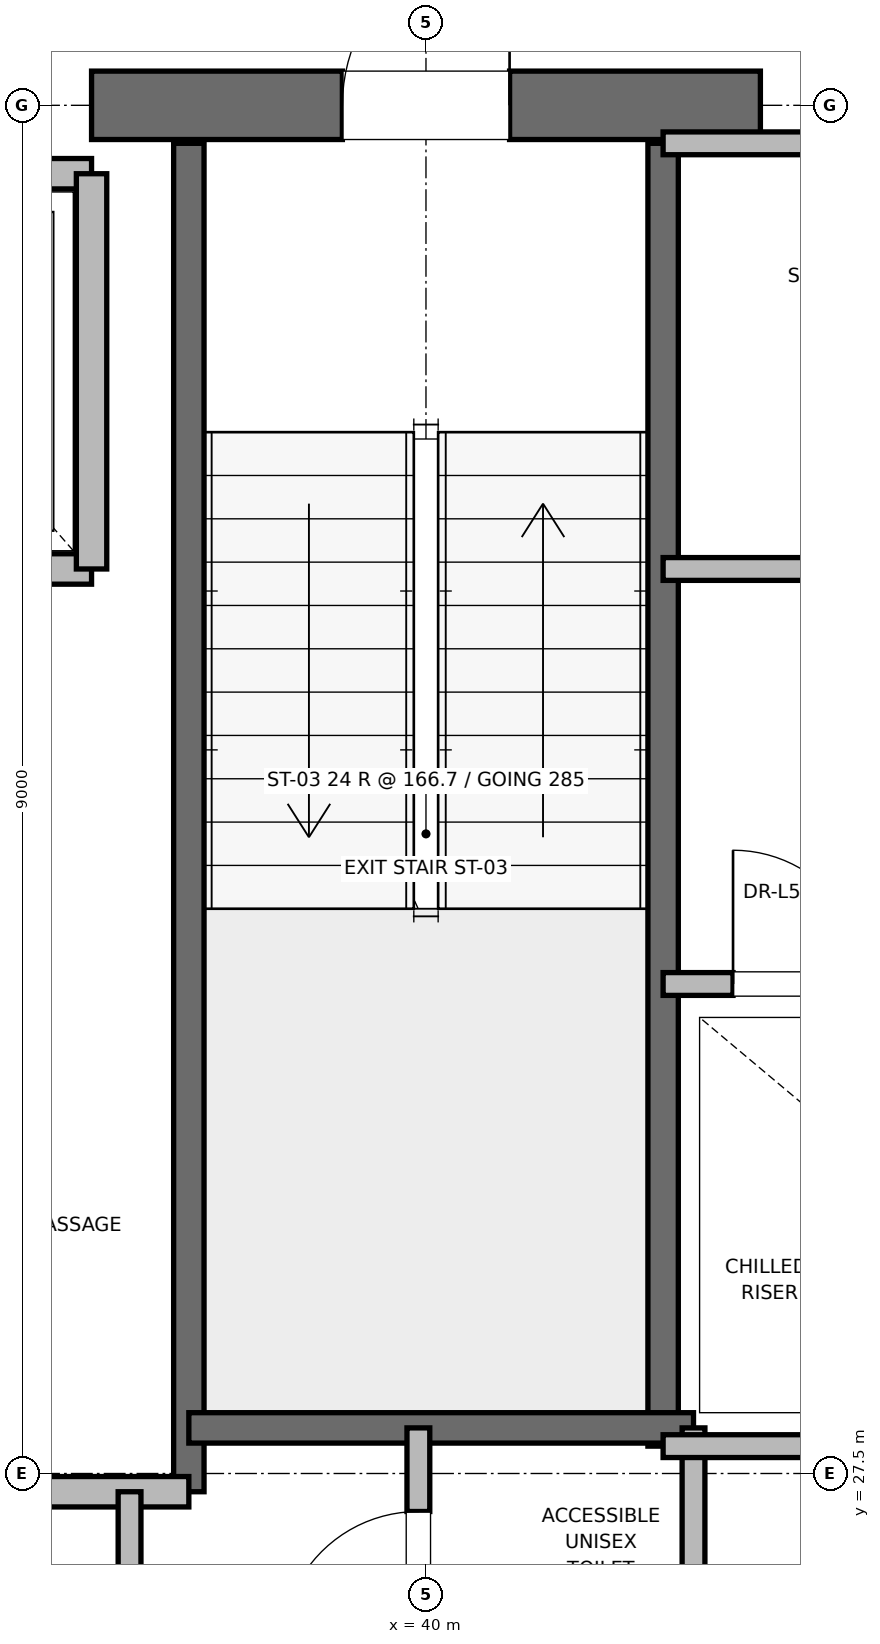
"""IFC4 building model, lengths in metres.
Left out: names, types, materials, properties, quantities, classifications, styles, units other than length and angle.
Written with IfcOpenShell. Run it as: python <this file> out.ifc"""

import sys

from ifc_helpers import new_model, si_unit, direction, frame, frame_2d, origin, place, context, subcontext, project, spatial, rectangle, extrude, element, fill, save


model = new_model("IFC4")
c1 = context("Model", 3, precision=1e-05, world=origin(), true_north=direction((0.0, 1.0)))
c2 = subcontext(c1, "Body", "Model", "MODEL_VIEW")
j1 = project(units=[si_unit("LENGTHUNIT", "METRE"), si_unit("PLANEANGLEUNIT", "RADIAN")], contexts=[c1])
p1 = place(None, origin())
s1 = spatial("IfcSite", under=j1, at=p1, CompositionType="ELEMENT")
p2 = place(p1, origin())
s2 = spatial("IfcBuilding", under=s1, at=p2, CompositionType="ELEMENT")
p3 = place(p2, frame((0.0, 0.0, 255.2)))
s3 = spatial("IfcBuildingStorey", under=s2, at=p3, CompositionType="ELEMENT", Elevation=255.2)
p4 = place(p3, frame((37.8, 36.5, 0.0), z_axis=(0.0, 0.0, 1.0), x_axis=(1.0, 0.0, 0.0)))
e1 = element("IfcWall", 1, at=p4, inside=s3, PredefinedType="SHEAR", context=c2, shape_type="SweptSolid", body=[
    extrude(rectangle(XDim=4.4, YDim=0.45, at=frame_2d((2.2, 0.0))), origin(), (0.0, 0.0, 1.0), 3.785),
])
p5 = place(p4, frame((1.65, 0.0, 0.0)))
e2 = element("IfcOpeningElement", 2, at=p5, cuts=e1, PredefinedType="OPENING", context=c2, shape_type="SweptSolid", body=[
    extrude(rectangle(XDim=1.1, YDim=2.15, at=frame_2d((0.55, 1.075))), frame((0.0, 0.225, 0.0), z_axis=(0.0, -1.0, 0.0), x_axis=(1.0, 0.0, 0.0)), (0.0, 0.0, 1.0), 0.45),
])
p6 = place(p3, frame((38.44, 27.38, 0.0), z_axis=(0.0, 0.0, 1.0), x_axis=(0.0, 1.0, 0.0)))
e3 = element("IfcWall", 3, at=p6, inside=s3, PredefinedType="SOLIDWALL", context=c2, shape_type="SweptSolid", body=[
    extrude(rectangle(XDim=8.87, YDim=0.2, at=frame_2d((4.435, 0.0))), origin(), (0.0, 0.0, 1.0), 3.785),
])
p7 = place(p3, frame((41.56, 27.68, 0.0), z_axis=(0.0, 0.0, 1.0), x_axis=(0.0, 1.0, 0.0)))
e4 = element("IfcWall", 4, at=p7, inside=s3, PredefinedType="SOLIDWALL", context=c2, shape_type="SweptSolid", body=[
    extrude(rectangle(XDim=8.57, YDim=0.2, at=frame_2d((4.285, 0.0))), origin(), (0.0, 0.0, 1.0), 3.785),
])
p8 = place(p3, frame((38.44, 27.8, 0.0), z_axis=(0.0, 0.0, 1.0), x_axis=(1.0, 0.0, 0.0)))
e5 = element("IfcWall", 5, at=p8, inside=s3, PredefinedType="SOLIDWALL", context=c2, shape_type="SweptSolid", body=[
    extrude(rectangle(XDim=3.32, YDim=0.2, at=frame_2d((1.66, 0.0))), origin(), (0.0, 0.0, 1.0), 3.785),
])
p9 = place(p3, frame((32.82, 27.38, 0.0), z_axis=(0.0, 0.0, 1.0), x_axis=(1.0, 0.0, 0.0)))
e6 = element("IfcWall", 6, at=p9, inside=s3, PredefinedType="PARTITIONING", context=c2, shape_type="SweptSolid", body=[
    extrude(rectangle(XDim=5.62, YDim=0.2, at=frame_2d((2.81, 0.0))), origin(), (0.0, 0.0, 1.0), 3.785),
])
p10 = place(p3, frame((35.5, 33.45, 0.0), z_axis=(0.0, 0.0, 1.0), x_axis=(1.0, 0.0, 0.0)))
e7 = element("IfcWall", 7, at=p10, inside=s3, PredefinedType="SOLIDWALL", context=c2, shape_type="SweptSolid", body=[
    extrude(rectangle(XDim=2.3, YDim=0.2, at=frame_2d((1.15, 0.0))), origin(), (0.0, 0.0, 1.0), 3.785),
])
p11 = place(p10, frame((0.6, 0.0, 0.0)))
e8 = element("IfcOpeningElement", 8, at=p11, cuts=e7, PredefinedType="OPENING", context=c2, shape_type="SweptSolid", body=[
    extrude(rectangle(XDim=1.1, YDim=2.2, at=frame_2d((0.55, 1.1))), frame((0.0, 0.1, 0.0), z_axis=(0.0, -1.0, 0.0), x_axis=(1.0, 0.0, 0.0)), (0.0, 0.0, 1.0), 0.2),
])
p12 = place(p3, frame((37.8, 36.05, 0.0), z_axis=(0.0, 0.0, 1.0), x_axis=(-1.0, 0.0, 0.0)))
e9 = element("IfcWall", 9, at=p12, inside=s3, PredefinedType="SOLIDWALL", context=c2, shape_type="SweptSolid", body=[
    extrude(rectangle(XDim=2.3, YDim=0.2, at=frame_2d((1.15, 0.0))), origin(), (0.0, 0.0, 1.0), 2.865),
])
p13 = place(p3, frame((37.8, 33.45, 0.0), z_axis=(0.0, 0.0, 1.0), x_axis=(0.0, 1.0, 0.0)))
e10 = element("IfcWall", 10, at=p13, inside=s3, PredefinedType="SOLIDWALL", context=c2, shape_type="SweptSolid", body=[
    extrude(rectangle(XDim=2.6, YDim=0.2, at=frame_2d((1.3, 0.0))), origin(), (0.0, 0.0, 1.0), 2.865),
])
p14 = place(p3, frame((41.76, 23.8, 0.0), z_axis=(0.0, 0.0, 1.0), x_axis=(0.0, 1.0, 0.0)))
e11 = element("IfcWall", 11, at=p14, inside=s3, PredefinedType="PARTITIONING", context=c2, shape_type="SweptSolid", body=[
    extrude(rectangle(XDim=4.0, YDim=0.15, at=frame_2d((2.0, 0.0))), origin(), (0.0, 0.0, 1.0), 2.85),
])
p15 = place(p3, frame((39.95, 25.8, 0.0), z_axis=(0.0, 0.0, 1.0), x_axis=(0.0, 1.0, 0.0)))
e12 = element("IfcWall", 12, at=p15, inside=s3, PredefinedType="PARTITIONING", context=c2, shape_type="SweptSolid", body=[
    extrude(rectangle(XDim=2.0, YDim=0.15, at=frame_2d((1.0, 0.0))), origin(), (0.0, 0.0, 1.0), 2.85),
])
p16 = place(p15, frame((0.55, 0.0, 0.0)))
e13 = element("IfcOpeningElement", 13, at=p16, cuts=e12, PredefinedType="OPENING", context=c2, shape_type="SweptSolid", body=[
    extrude(rectangle(XDim=0.9, YDim=2.1, at=frame_2d((0.45, 1.05))), frame((0.0, 0.075, 0.0), z_axis=(0.0, -1.0, 0.0), x_axis=(1.0, 0.0, 0.0)), (0.0, 0.0, 1.0), 0.15),
])
p17 = place(p3, frame((38.05, 23.06, 0.0), z_axis=(0.0, 0.0, 1.0), x_axis=(0.0, 1.0, 0.0)))
e14 = element("IfcWall", 14, at=p17, inside=s3, PredefinedType="PARTITIONING", context=c2, shape_type="SweptSolid", body=[
    extrude(rectangle(XDim=4.32, YDim=0.15, at=frame_2d((2.16, 0.0))), origin(), (0.0, 0.0, 1.0), 2.85),
])
p18 = place(p17, frame((1.66, 0.0, 0.0)))
e15 = element("IfcOpeningElement", 15, at=p18, cuts=e14, PredefinedType="OPENING", context=c2, shape_type="SweptSolid", body=[
    extrude(rectangle(XDim=1.0, YDim=2.15, at=frame_2d((0.5, 1.075))), frame((0.0, 0.075, 0.0), z_axis=(0.0, -1.0, 0.0), x_axis=(1.0, 0.0, 0.0)), (0.0, 0.0, 1.0), 0.15),
])
p19 = place(p3, frame((41.56, 27.68, 0.0), z_axis=(0.0, 0.0, 1.0), x_axis=(1.0, 0.0, 0.0)))
e16 = element("IfcWall", 16, at=p19, inside=s3, PredefinedType="PARTITIONING", context=c2, shape_type="SweptSolid", body=[
    extrude(rectangle(XDim=3.59, YDim=0.15, at=frame_2d((1.795, 0.0))), origin(), (0.0, 0.0, 1.0), 2.85),
])
p20 = place(p3, frame((41.56, 30.72, 0.0), z_axis=(0.0, 0.0, 1.0), x_axis=(1.0, 0.0, 0.0)))
e17 = element("IfcWall", 17, at=p20, inside=s3, PredefinedType="PARTITIONING", context=c2, shape_type="SweptSolid", body=[
    extrude(rectangle(XDim=1.8, YDim=0.15, at=frame_2d((0.9, 0.0))), origin(), (0.0, 0.0, 1.0), 2.85),
])
p21 = place(p20, frame((0.46, 0.0, 0.0)))
e18 = element("IfcOpeningElement", 18, at=p21, cuts=e17, PredefinedType="OPENING", context=c2, shape_type="SweptSolid", body=[
    extrude(rectangle(XDim=0.88, YDim=2.1, at=frame_2d((0.44, 1.05))), frame((0.0, 0.075, 0.0), z_axis=(0.0, -1.0, 0.0), x_axis=(1.0, 0.0, 0.0)), (0.0, 0.0, 1.0), 0.15),
])
p22 = place(p3, frame((41.56, 36.25, 0.0), z_axis=(0.0, 0.0, 1.0), x_axis=(1.0, 0.0, 0.0)))
e19 = element("IfcWall", 19, at=p22, inside=s3, PredefinedType="PARTITIONING", context=c2, shape_type="SweptSolid", body=[
    extrude(rectangle(XDim=2.94, YDim=0.15, at=frame_2d((1.47, 0.0))), origin(), (0.0, 0.0, 1.0), 2.85),
])
p23 = place(p3, frame((41.56, 33.45, 0.0), z_axis=(0.0, 0.0, 1.0), x_axis=(1.0, 0.0, 0.0)))
e20 = element("IfcWall", 20, at=p23, inside=s3, PredefinedType="PARTITIONING", context=c2, shape_type="SweptSolid", body=[
    extrude(rectangle(XDim=2.94, YDim=0.15, at=frame_2d((1.47, 0.0))), origin(), (0.0, 0.0, 1.0), 2.85),
])
p24 = place(p23, frame((1.03, 0.0, 0.0)))
e21 = element("IfcOpeningElement", 21, at=p24, cuts=e20, PredefinedType="OPENING", context=c2, shape_type="SweptSolid", body=[
    extrude(rectangle(XDim=0.88, YDim=2.1, at=frame_2d((0.44, 1.05))), frame((0.0, 0.075, 0.0), z_axis=(0.0, -1.0, 0.0), x_axis=(1.0, 0.0, 0.0)), (0.0, 0.0, 1.0), 0.15),
])
p25 = place(p5, origin())
e22 = element("IfcDoor", 22, at=p25, inside=s3, OperationType="SINGLE_SWING_RIGHT", PredefinedType="DOOR", context=c2, shape_type="SweptSolid", body=[
    extrude(rectangle(XDim=1.1, YDim=2.15, at=frame_2d((0.55, 1.075))), frame((0.0, 0.025, 0.0), z_axis=(0.0, -1.0, 0.0), x_axis=(1.0, 0.0, 0.0)), (0.0, 0.0, 1.0), 0.05),
])
fill(e2, e22)
p26 = place(p16, origin())
e23 = element("IfcDoor", 23, at=p26, inside=s3, OperationType="SINGLE_SWING_LEFT", PredefinedType="DOOR", context=c2, shape_type="SweptSolid", body=[
    extrude(rectangle(XDim=0.9, YDim=2.1, at=frame_2d((0.45, 1.05))), frame((0.0, 0.025, 0.0), z_axis=(0.0, -1.0, 0.0), x_axis=(1.0, 0.0, 0.0)), (0.0, 0.0, 1.0), 0.05),
])
fill(e13, e23)
p27 = place(p21, origin())
e24 = element("IfcDoor", 24, at=p27, inside=s3, OperationType="SINGLE_SWING_LEFT", PredefinedType="DOOR", context=c2, shape_type="SweptSolid", body=[
    extrude(rectangle(XDim=0.88, YDim=2.1, at=frame_2d((0.44, 1.05))), frame((0.0, 0.025, 0.0), z_axis=(0.0, -1.0, 0.0), x_axis=(1.0, 0.0, 0.0)), (0.0, 0.0, 1.0), 0.05),
])
fill(e18, e24)
save(model, sys.argv[1])
